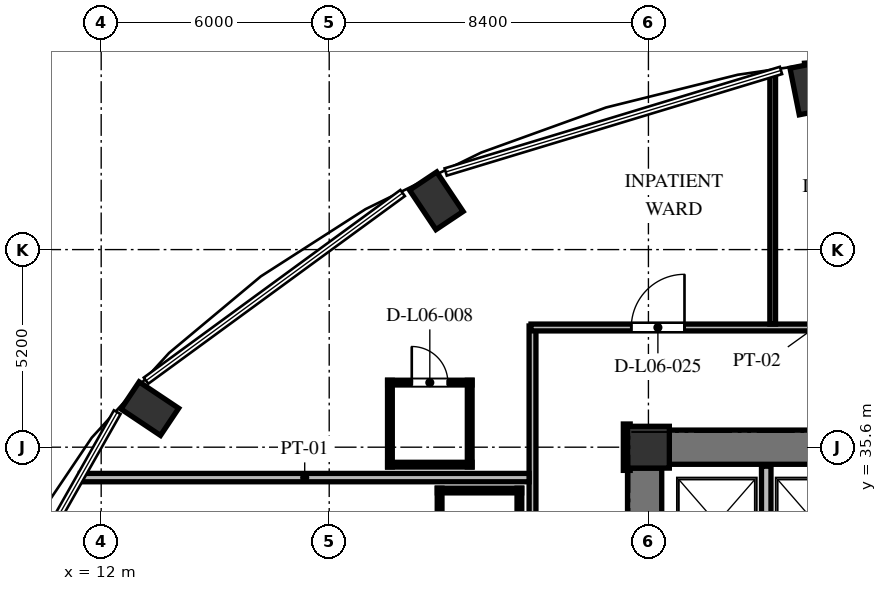
"""IFC4 building model, lengths in metres.
Left out: names, types, materials, properties, quantities, classifications, styles, units other than length and angle.
Written with IfcOpenShell. Run it as: python <this file> out.ifc"""

import sys

from ifc_helpers import new_model, si_unit, direction, frame, frame_2d, origin, origin_2d, place, context, subcontext, project, spatial, rectangle, extrude, element, fill, save


model = new_model("IFC4")
c1 = context("Model", 3, precision=1e-05, world=origin(), true_north=direction((0.0, 1.0)))
c2 = subcontext(c1, "Body", "Model", "MODEL_VIEW")
j1 = project(units=[si_unit("LENGTHUNIT", "METRE"), si_unit("PLANEANGLEUNIT", "RADIAN")], contexts=[c1])
p1 = place(None, origin())
s1 = spatial("IfcSite", under=j1, at=p1, CompositionType="ELEMENT")
p2 = place(p1, origin())
s2 = spatial("IfcBuilding", under=s1, at=p2, CompositionType="ELEMENT")
p3 = place(p2, frame((0.0, 0.0, 28.848)))
s3 = spatial("IfcBuildingStorey", under=s2, at=p3, CompositionType="ELEMENT", Elevation=28.848)
for number, where, z_axis, x_axis in (
    (1, (30.669, 45.044, 0.0), (0.0, 0.0, 1.0), (-0.195, 0.981, 0.0)),
    (2, (20.819, 42.084, 0.0), (0.0, 0.0, 1.0), (-0.556, 0.831, 0.0)),
    (3, (13.28, 36.614, 0.0), (0.0, 0.0, 1.0), (-0.831, 0.556, 0.0)),
):
    element("IfcColumn", number, at=place(p3, frame(where, z_axis=z_axis, x_axis=x_axis)), inside=s3, PredefinedType="COLUMN", context=c2, shape_type="SweptSolid", body=[
        extrude(rectangle(XDim=1.25, YDim=0.86, at=origin_2d()), origin(), (0.0, 0.0, 1.0), 3.648),
    ])
p4 = place(p3, frame((26.4, 35.6, 0.0), z_axis=(0.0, 0.0, 1.0), x_axis=(1.0, 0.0, 0.0)))
e4 = element("IfcColumn", 4, at=p4, inside=s3, PredefinedType="COLUMN", context=c2, shape_type="SweptSolid", body=[
    extrude(rectangle(XDim=1.1, YDim=1.1, at=origin_2d()), origin(), (0.0, 0.0, 1.0), 3.648),
])
p5 = place(p3, frame((26.3, 20.95, 0.0), z_axis=(0.0, 0.0, 1.0), x_axis=(0.0, 1.0, 0.0)))
e5 = element("IfcWall", 5, at=p5, inside=s3, PredefinedType="SHEAR", context=c2, shape_type="SweptSolid", body=[
    extrude(rectangle(XDim=14.1, YDim=0.9, at=frame_2d((7.05, 0.0))), origin(), (0.0, 0.0, 1.0), 3.648),
])
p6 = place(p5, frame((6.5, 0.0, 0.0)))
e6 = element("IfcOpeningElement", 6, at=p6, cuts=e5, PredefinedType="OPENING", context=c2, shape_type="SweptSolid", body=[
    extrude(rectangle(XDim=1.2, YDim=2.15, at=frame_2d((0.6, 1.075))), frame((0.0, 0.46, 0.0), z_axis=(0.0, -1.0, 0.0), x_axis=(1.0, 0.0, 0.0)), (0.0, 0.0, 1.0), 0.92),
])
p7 = place(p5, frame((9.6, 0.0, 0.0)))
e7 = element("IfcOpeningElement", 7, at=p7, cuts=e5, PredefinedType="OPENING", context=c2, shape_type="SweptSolid", body=[
    extrude(rectangle(XDim=1.3, YDim=2.2, at=frame_2d((0.65, 1.1))), frame((0.0, 0.46, 0.0), z_axis=(0.0, -1.0, 0.0), x_axis=(1.0, 0.0, 0.0)), (0.0, 0.0, 1.0), 0.92),
])
p8 = place(p5, frame((3.26, 0.0, 0.0)))
e8 = element("IfcOpeningElement", 8, at=p8, cuts=e5, PredefinedType="OPENING", context=c2, shape_type="SweptSolid", body=[
    extrude(rectangle(XDim=1.3, YDim=2.2, at=frame_2d((0.65, 1.1))), frame((0.0, 0.46, 0.0), z_axis=(0.0, -1.0, 0.0), x_axis=(1.0, 0.0, 0.0)), (0.0, 0.0, 1.0), 0.92),
])
p9 = place(p3, frame((26.95, 35.6, 0.0), z_axis=(0.0, 0.0, 1.0), x_axis=(1.0, 0.0, 0.0)))
e9 = element("IfcWall", 9, at=p9, inside=s3, PredefinedType="SHEAR", context=c2, shape_type="SweptSolid", body=[
    extrude(rectangle(XDim=5.3, YDim=0.9, at=frame_2d((2.65, 0.0))), origin(), (0.0, 0.0, 1.0), 3.648),
])
p10 = place(p3, frame((36.179, 45.953, 0.0), z_axis=(0.0, 0.0, 1.0), x_axis=(-0.997421878774, -0.071760683825, 0.0)))
e10 = element("IfcWall", 10, at=p10, inside=s3, PredefinedType="SOLIDWALL", context=c2, shape_type="SweptSolid", body=[
    extrude(rectangle(XDim=5.675, YDim=0.32, at=frame_2d((2.837, 0.0))), origin(), (0.0, 0.0, 1.0), 3.428),
])
p11 = place(p10, frame((2.696, 0.0, 0.85)))
e11 = element("IfcOpeningElement", 11, at=p11, cuts=e10, PredefinedType="OPENING", context=c2, shape_type="SweptSolid", body=[
    extrude(rectangle(XDim=1.2, YDim=1.8, at=frame_2d((0.6, 0.9))), frame((0.0, 0.17, 0.0), z_axis=(0.0, -1.0, 0.0), x_axis=(1.0, 0.0, 0.0)), (0.0, 0.0, 1.0), 0.34),
])
p12 = place(p3, frame((29.5, 32.42, 0.0), z_axis=(0.0, 0.0, 1.0), x_axis=(0.0, 1.0, 0.0)))
e12 = element("IfcWall", 12, at=p12, inside=s3, PredefinedType="SOLIDWALL", context=c2, shape_type="SweptSolid", body=[
    extrude(rectangle(XDim=2.68, YDim=0.25, at=frame_2d((1.34, 0.0))), origin(), (0.0, 0.0, 1.0), 3.428),
])
p13 = place(p3, frame((23.35, 29.36, 0.0), z_axis=(0.0, 0.0, 1.0), x_axis=(0.0, 1.0, 0.0)))
e13 = element("IfcWall", 13, at=p13, inside=s3, PredefinedType="PARTITIONING", context=c2, shape_type="SweptSolid", body=[
    extrude(rectangle(XDim=9.43, YDim=0.18, at=frame_2d((4.715, 0.0))), origin(), (0.0, 0.0, 1.0), 3.428),
])
p14 = place(p3, frame((23.31, 38.75, 0.0), z_axis=(0.0, 0.0, 1.0), x_axis=(1.0, 0.0, 0.0)))
e14 = element("IfcWall", 14, at=p14, inside=s3, PredefinedType="PARTITIONING", context=c2, shape_type="SweptSolid", body=[
    extrude(rectangle(XDim=29.88, YDim=0.18, at=frame_2d((14.94, 0.0))), origin(), (0.0, 0.0, 1.0), 3.053),
])
p15 = place(p14, frame((25.591, 0.0, 0.0)))
e15 = element("IfcOpeningElement", 15, at=p15, cuts=e14, PredefinedType="OPENING", context=c2, shape_type="SweptSolid", body=[
    extrude(rectangle(XDim=1.4, YDim=2.2, at=frame_2d((0.7, 1.1))), frame((0.0, 0.1, 0.0), z_axis=(0.0, -1.0, 0.0), x_axis=(1.0, 0.0, 0.0)), (0.0, 0.0, 1.0), 0.2),
])
p16 = place(p14, frame((20.24, 0.0, 0.0)))
e16 = element("IfcOpeningElement", 16, at=p16, cuts=e14, PredefinedType="OPENING", context=c2, shape_type="SweptSolid", body=[
    extrude(rectangle(XDim=1.4, YDim=2.2, at=frame_2d((0.7, 1.1))), frame((0.0, 0.1, 0.0), z_axis=(0.0, -1.0, 0.0), x_axis=(1.0, 0.0, 0.0)), (0.0, 0.0, 1.0), 0.2),
])
p17 = place(p14, frame((16.075, 0.0, 0.0)))
e17 = element("IfcOpeningElement", 17, at=p17, cuts=e14, PredefinedType="OPENING", context=c2, shape_type="SweptSolid", body=[
    extrude(rectangle(XDim=1.4, YDim=2.2, at=frame_2d((0.7, 1.1))), frame((0.0, 0.1, 0.0), z_axis=(0.0, -1.0, 0.0), x_axis=(1.0, 0.0, 0.0)), (0.0, 0.0, 1.0), 0.2),
])
p18 = place(p14, frame((11.905, 0.0, 0.0)))
e18 = element("IfcOpeningElement", 18, at=p18, cuts=e14, PredefinedType="OPENING", context=c2, shape_type="SweptSolid", body=[
    extrude(rectangle(XDim=1.4, YDim=2.2, at=frame_2d((0.7, 1.1))), frame((0.0, 0.1, 0.0), z_axis=(0.0, -1.0, 0.0), x_axis=(1.0, 0.0, 0.0)), (0.0, 0.0, 1.0), 0.2),
])
p19 = place(p14, frame((7.74, 0.0, 0.0)))
e19 = element("IfcOpeningElement", 19, at=p19, cuts=e14, PredefinedType="OPENING", context=c2, shape_type="SweptSolid", body=[
    extrude(rectangle(XDim=1.4, YDim=2.2, at=frame_2d((0.7, 1.1))), frame((0.0, 0.1, 0.0), z_axis=(0.0, -1.0, 0.0), x_axis=(1.0, 0.0, 0.0)), (0.0, 0.0, 1.0), 0.2),
])
p20 = place(p14, frame((2.639, 0.0, 0.0)))
e20 = element("IfcOpeningElement", 20, at=p20, cuts=e14, PredefinedType="OPENING", context=c2, shape_type="SweptSolid", body=[
    extrude(rectangle(XDim=1.4, YDim=2.2, at=frame_2d((0.7, 1.1))), frame((0.0, 0.1, 0.0), z_axis=(0.0, -1.0, 0.0), x_axis=(1.0, 0.0, 0.0)), (0.0, 0.0, 1.0), 0.2),
])
p21 = place(p3, frame((25.83, 36.21, 0.0), z_axis=(0.0, 0.0, 1.0), x_axis=(0.0, -1.0, 0.0)))
e21 = element("IfcWall", 21, at=p21, inside=s3, PredefinedType="PARTITIONING", context=c2, shape_type="SweptSolid", body=[
    extrude(rectangle(XDim=1.22, YDim=0.18, at=frame_2d((0.61, 0.0))), origin(), (0.0, 0.0, 1.0), 3.428),
])
p22 = place(p3, frame((11.451, 34.8, 0.0), z_axis=(0.0, 0.0, 1.0), x_axis=(1.0, 0.0, 0.0)))
e22 = element("IfcWall", 22, at=p22, inside=s3, PredefinedType="PARTITIONING", context=c2, shape_type="SweptSolid", body=[
    extrude(rectangle(XDim=11.809, YDim=0.22, at=frame_2d((5.905, 0.0))), origin(), (0.0, 0.0, 1.0), 3.428),
])
p23 = place(p3, frame((29.67, 38.84, 0.0), z_axis=(0.0, 0.0, 1.0), x_axis=(0.0, 1.0, 0.0)))
e23 = element("IfcWall", 23, at=p23, inside=s3, PredefinedType="PARTITIONING", context=c2, shape_type="SweptSolid", body=[
    extrude(rectangle(XDim=6.596, YDim=0.15, at=frame_2d((3.298, 0.0))), origin(), (0.0, 0.0, 1.0), 3.428),
])
p24 = place(p3, frame((19.538, 37.3, 0.0), z_axis=(0.0, 0.0, 1.0), x_axis=(1.0, 0.0, 0.0)))
e24 = element("IfcWall", 24, at=p24, inside=s3, PredefinedType="PARTITIONING", context=c2, shape_type="SweptSolid", body=[
    extrude(rectangle(XDim=2.22, YDim=0.125, at=frame_2d((1.11, 0.0))), origin(), (0.0, 0.0, 1.0), 3.428),
])
p25 = place(p24, frame((0.635, 0.0, 0.0)))
e25 = element("IfcOpeningElement", 25, at=p25, cuts=e24, PredefinedType="OPENING", context=c2, shape_type="SweptSolid", body=[
    extrude(rectangle(XDim=0.95, YDim=2.1, at=frame_2d((0.475, 1.05))), frame((0.0, 0.073, 0.0), z_axis=(0.0, -1.0, 0.0), x_axis=(1.0, 0.0, 0.0)), (0.0, 0.0, 1.0), 0.145),
])
p26 = place(p3, frame((19.538, 35.14, 0.0), z_axis=(0.0, 0.0, 1.0), x_axis=(1.0, 0.0, 0.0)))
e26 = element("IfcWall", 26, at=p26, inside=s3, PredefinedType="PARTITIONING", context=c2, shape_type="SweptSolid", body=[
    extrude(rectangle(XDim=2.22, YDim=0.125, at=frame_2d((1.11, 0.0))), origin(), (0.0, 0.0, 1.0), 3.428),
])
for number, where, z_axis, x_axis in (
    (27, (21.698, 35.08, 0.0), (0.0, 0.0, 1.0), (0.0, 1.0, 0.0)),
    (28, (19.597, 35.08, 0.0), (0.0, 0.0, 1.0), (0.0, 1.0, 0.0)),
):
    element("IfcWall", number, at=place(p3, frame(where, z_axis=z_axis, x_axis=x_axis)), inside=s3, PredefinedType="PARTITIONING", context=c2, shape_type="SweptSolid", body=[
        extrude(rectangle(XDim=2.28, YDim=0.125, at=frame_2d((1.14, 0.0))), origin(), (0.0, 0.0, 1.0), 3.428),
    ])
p27 = place(p3, frame((20.845, 34.46, 0.0), z_axis=(0.0, 0.0, 1.0), x_axis=(1.0, 0.0, 0.0)))
e29 = element("IfcWall", 29, at=p27, inside=s3, PredefinedType="PARTITIONING", context=c2, shape_type="SweptSolid", body=[
    extrude(rectangle(XDim=2.22, YDim=0.125, at=frame_2d((1.11, 0.0))), origin(), (0.0, 0.0, 1.0), 3.428),
])
for number, where, z_axis, x_axis in (
    (30, (23.005, 32.24, 0.0), (0.0, 0.0, 1.0), (0.0, 1.0, 0.0)),
    (31, (20.905, 32.24, 0.0), (0.0, 0.0, 1.0), (0.0, 1.0, 0.0)),
):
    element("IfcWall", number, at=place(p3, frame(where, z_axis=z_axis, x_axis=x_axis)), inside=s3, PredefinedType="PARTITIONING", context=c2, shape_type="SweptSolid", body=[
        extrude(rectangle(XDim=2.28, YDim=0.125, at=frame_2d((1.14, 0.0))), origin(), (0.0, 0.0, 1.0), 3.428),
    ])
p28 = place(p25, origin())
e32 = element("IfcDoor", 32, at=p28, inside=s3, OperationType="SINGLE_SWING_LEFT", PredefinedType="DOOR", context=c2, shape_type="SweptSolid", body=[
    extrude(rectangle(XDim=0.95, YDim=2.1, at=frame_2d((0.475, 1.05))), frame((0.0, 0.025, 0.0), z_axis=(0.0, -1.0, 0.0), x_axis=(1.0, 0.0, 0.0)), (0.0, 0.0, 1.0), 0.05),
])
fill(e25, e32)
p29 = place(p20, origin())
e33 = element("IfcDoor", 33, at=p29, inside=s3, OperationType="SINGLE_SWING_RIGHT", PredefinedType="DOOR", context=c2, shape_type="SweptSolid", body=[
    extrude(rectangle(XDim=1.4, YDim=2.2, at=frame_2d((0.7, 1.1))), frame((0.0, 0.025, 0.0), z_axis=(0.0, -1.0, 0.0), x_axis=(1.0, 0.0, 0.0)), (0.0, 0.0, 1.0), 0.05),
])
fill(e20, e33)
save(model, sys.argv[1])
